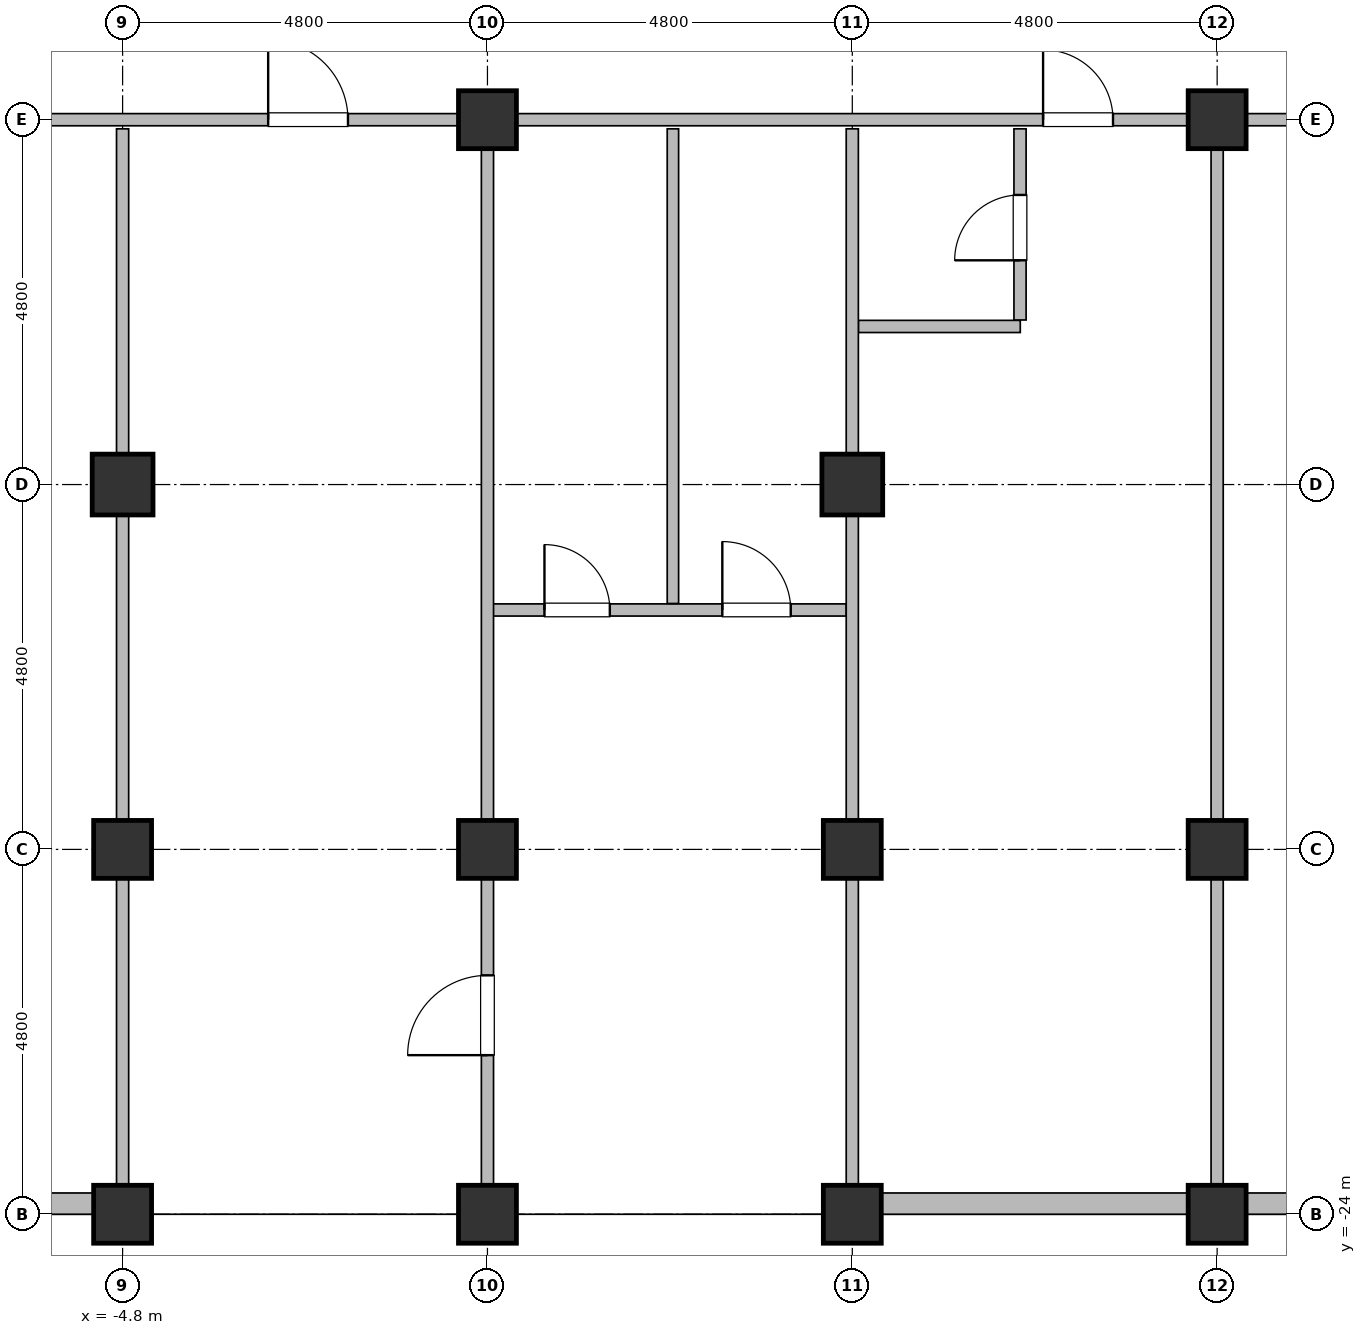
"""IFC4 building model, lengths in metres.
Left out: names, types, materials, properties, quantities, classifications, styles, units other than length and angle.
Written with IfcOpenShell. Run it as: python <this file> out.ifc"""

import sys

from ifc_helpers import new_model, si_unit, direction, frame, frame_2d, origin, origin_2d, place, context, subcontext, project, spatial, rectangle, hollow_rectangle, hollow_circle, extrude, element, fill, save


model = new_model("IFC4")
c1 = context("Model", 3, precision=1e-05, world=origin(), true_north=direction((0.0, 1.0)))
c2 = subcontext(c1, "Body", "Model", "MODEL_VIEW")
j1 = project(units=[si_unit("LENGTHUNIT", "METRE"), si_unit("PLANEANGLEUNIT", "RADIAN")], contexts=[c1])
p1 = place(None, origin())
s1 = spatial("IfcSite", under=j1, at=p1, CompositionType="ELEMENT")
p2 = place(p1, origin())
s2 = spatial("IfcBuilding", under=s1, at=p2, CompositionType="ELEMENT")
p3 = place(p2, frame((0.0, 0.0, 48.5)))
s3 = spatial("IfcBuildingStorey", under=s2, at=p3, CompositionType="ELEMENT", Elevation=48.5)
for number, where, z_axis, x_axis in (
    (1, (-4.8, -24.0, 0.0), (0.0, 0.0, 1.0), (1.0, 0.0, 0.0)),
    (2, (-4.8, -19.2, 0.0), (0.0, 0.0, 1.0), (1.0, 0.0, 0.0)),
):
    element("IfcColumn", number, at=place(p3, frame(where, z_axis=z_axis, x_axis=x_axis)), inside=s3, PredefinedType="COLUMN", context=c2, shape_type="SweptSolid", body=[
        extrude(hollow_circle(Radius=0.381, WallThickness=0.032, at=origin_2d()), origin(), (0.0, 0.0, 1.0), 3.7),
    ])
p4 = place(p3, frame((-4.8, -14.4, 0.0), z_axis=(0.0, 0.0, 1.0), x_axis=(1.0, 0.0, 0.0)))
e3 = element("IfcColumn", 3, at=p4, inside=s3, PredefinedType="COLUMN", context=c2, shape_type="SweptSolid", body=[
    extrude(hollow_rectangle(XDim=0.8, YDim=0.8, WallThickness=0.036, at=origin_2d()), origin(), (0.0, 0.0, 1.0), 3.7),
])
for number, where, z_axis, x_axis in (
    (4, (0.0, -24.0, 0.0), (0.0, 0.0, 1.0), (1.0, 0.0, 0.0)),
    (5, (0.0, -19.2, 0.0), (0.0, 0.0, 1.0), (1.0, 0.0, 0.0)),
    (6, (0.0, -9.6, 0.0), (0.0, 0.0, 1.0), (1.0, 0.0, 0.0)),
    (7, (4.8, -24.0, 0.0), (0.0, 0.0, 1.0), (1.0, 0.0, 0.0)),
    (8, (4.8, -19.2, 0.0), (0.0, 0.0, 1.0), (1.0, 0.0, 0.0)),
):
    element("IfcColumn", number, at=place(p3, frame(where, z_axis=z_axis, x_axis=x_axis)), inside=s3, PredefinedType="COLUMN", context=c2, shape_type="SweptSolid", body=[
        extrude(hollow_circle(Radius=0.381, WallThickness=0.032, at=origin_2d()), origin(), (0.0, 0.0, 1.0), 3.7),
    ])
p5 = place(p3, frame((4.8, -14.4, 0.0), z_axis=(0.0, 0.0, 1.0), x_axis=(1.0, 0.0, 0.0)))
e9 = element("IfcColumn", 9, at=p5, inside=s3, PredefinedType="COLUMN", context=c2, shape_type="SweptSolid", body=[
    extrude(hollow_rectangle(XDim=0.8, YDim=0.8, WallThickness=0.036, at=origin_2d()), origin(), (0.0, 0.0, 1.0), 3.7),
])
for number, where, z_axis, x_axis in (
    (10, (9.6, -24.0, 0.0), (0.0, 0.0, 1.0), (1.0, 0.0, 0.0)),
    (11, (9.6, -19.2, 0.0), (0.0, 0.0, 1.0), (1.0, 0.0, 0.0)),
    (12, (9.6, -9.6, 0.0), (0.0, 0.0, 1.0), (1.0, 0.0, 0.0)),
):
    element("IfcColumn", number, at=place(p3, frame(where, z_axis=z_axis, x_axis=x_axis)), inside=s3, PredefinedType="COLUMN", context=c2, shape_type="SweptSolid", body=[
        extrude(hollow_circle(Radius=0.381, WallThickness=0.032, at=origin_2d()), origin(), (0.0, 0.0, 1.0), 3.7),
    ])
p6 = place(p3, frame((-30.0, -23.86, 0.0), z_axis=(0.0, 0.0, 1.0), x_axis=(1.0, 0.0, 0.0)))
e13 = element("IfcWall", 13, at=p6, inside=s3, PredefinedType="SOLIDWALL", context=c2, shape_type="SweptSolid", body=[
    extrude(rectangle(XDim=25.25, YDim=0.28, at=frame_2d((12.625, 0.0))), origin(), (0.0, 0.0, 1.0), 2.12),
])
p7 = place(p6, frame((11.798, 0.0, 0.75)))
e14 = element("IfcOpeningElement", 14, at=p7, cuts=e13, PredefinedType="OPENING", context=c2, shape_type="SweptSolid", body=[
    extrude(rectangle(XDim=1.8, YDim=1.15, at=frame_2d((0.9, 0.575))), frame((0.0, 0.155, 0.0), z_axis=(0.0, -1.0, 0.0), x_axis=(1.0, 0.0, 0.0)), (0.0, 0.0, 1.0), 0.31),
])
p8 = place(p3, frame((4.75, -23.86, 0.0), z_axis=(0.0, 0.0, 1.0), x_axis=(1.0, 0.0, 0.0)))
e15 = element("IfcWall", 15, at=p8, inside=s3, PredefinedType="SOLIDWALL", context=c2, shape_type="SweptSolid", body=[
    extrude(rectangle(XDim=20.45, YDim=0.28, at=frame_2d((10.225, 0.0))), origin(), (0.0, 0.0, 1.0), 2.12),
])
p9 = place(p8, frame((1.55, 0.0, 0.75)))
e16 = element("IfcOpeningElement", 16, at=p9, cuts=e15, PredefinedType="OPENING", context=c2, shape_type="SweptSolid", body=[
    extrude(rectangle(XDim=1.8, YDim=1.15, at=frame_2d((0.9, 0.575))), frame((0.0, 0.155, 0.0), z_axis=(0.0, -1.0, 0.0), x_axis=(1.0, 0.0, 0.0)), (0.0, 0.0, 1.0), 0.31),
])
p10 = place(p8, frame((6.35, 0.0, 0.75)))
e17 = element("IfcOpeningElement", 17, at=p10, cuts=e15, PredefinedType="OPENING", context=c2, shape_type="SweptSolid", body=[
    extrude(rectangle(XDim=1.8, YDim=1.15, at=frame_2d((0.9, 0.575))), frame((0.0, 0.155, 0.0), z_axis=(0.0, -1.0, 0.0), x_axis=(1.0, 0.0, 0.0)), (0.0, 0.0, 1.0), 0.31),
])
p11 = place(p8, frame((11.15, 0.0, 0.75)))
e18 = element("IfcOpeningElement", 18, at=p11, cuts=e15, PredefinedType="OPENING", context=c2, shape_type="SweptSolid", body=[
    extrude(rectangle(XDim=1.8, YDim=1.15, at=frame_2d((0.9, 0.575))), frame((0.0, 0.155, 0.0), z_axis=(0.0, -1.0, 0.0), x_axis=(1.0, 0.0, 0.0)), (0.0, 0.0, 1.0), 0.31),
])
p12 = place(p3, frame((0.0, -16.05, 0.0), z_axis=(0.0, 0.0, 1.0), x_axis=(1.0, 0.0, 0.0)))
e19 = element("IfcWall", 19, at=p12, inside=s3, PredefinedType="PARTITIONING", context=c2, shape_type="SweptSolid", body=[
    extrude(rectangle(XDim=4.72, YDim=0.16, at=frame_2d((2.36, 0.0))), origin(), (0.0, 0.0, 1.0), 2.82),
])
p13 = place(p12, frame((0.75, 0.0, 0.0)))
e20 = element("IfcOpeningElement", 20, at=p13, cuts=e19, PredefinedType="OPENING", context=c2, shape_type="SweptSolid", body=[
    extrude(rectangle(XDim=0.86, YDim=2.1, at=frame_2d((0.43, 1.05))), frame((0.0, 0.095, 0.0), z_axis=(0.0, -1.0, 0.0), x_axis=(1.0, 0.0, 0.0)), (0.0, 0.0, 1.0), 0.19),
])
p14 = place(p12, frame((3.09, 0.0, 0.0)))
e21 = element("IfcOpeningElement", 21, at=p14, cuts=e19, PredefinedType="OPENING", context=c2, shape_type="SweptSolid", body=[
    extrude(rectangle(XDim=0.9, YDim=2.1, at=frame_2d((0.45, 1.05))), frame((0.0, 0.095, 0.0), z_axis=(0.0, -1.0, 0.0), x_axis=(1.0, 0.0, 0.0)), (0.0, 0.0, 1.0), 0.19),
])
p15 = place(p3, frame((4.88, -12.32, 0.0), z_axis=(0.0, 0.0, 1.0), x_axis=(1.0, 0.0, 0.0)))
e22 = element("IfcWall", 22, at=p15, inside=s3, PredefinedType="PARTITIONING", context=c2, shape_type="SweptSolid", body=[
    extrude(rectangle(XDim=2.13, YDim=0.16, at=frame_2d((1.065, 0.0))), origin(), (0.0, 0.0, 1.0), 2.82),
])
p16 = place(p3, frame((-33.31, -9.6, 0.0), z_axis=(0.0, 0.0, 1.0), x_axis=(1.0, 0.0, 0.0)))
e23 = element("IfcWall", 23, at=p16, inside=s3, PredefinedType="PARTITIONING", context=c2, shape_type="SweptSolid", body=[
    extrude(rectangle(XDim=61.82, YDim=0.16, at=frame_2d((30.91, 0.0))), origin(), (0.0, 0.0, 1.0), 2.62),
])
p17 = place(p16, frame((6.42, 0.0, 0.0)))
e24 = element("IfcOpeningElement", 24, at=p17, cuts=e23, PredefinedType="OPENING", context=c2, shape_type="SweptSolid", body=[
    extrude(rectangle(XDim=0.9, YDim=2.1, at=frame_2d((0.45, 1.05))), frame((0.0, 0.095, 0.0), z_axis=(0.0, -1.0, 0.0), x_axis=(1.0, 0.0, 0.0)), (0.0, 0.0, 1.0), 0.19),
])
p18 = place(p16, frame((54.5, 0.0, 0.0)))
e25 = element("IfcOpeningElement", 25, at=p18, cuts=e23, PredefinedType="OPENING", context=c2, shape_type="SweptSolid", body=[
    extrude(rectangle(XDim=0.9, YDim=2.1, at=frame_2d((0.45, 1.05))), frame((0.0, 0.095, 0.0), z_axis=(0.0, -1.0, 0.0), x_axis=(1.0, 0.0, 0.0)), (0.0, 0.0, 1.0), 0.19),
])
p19 = place(p16, frame((11.26, 0.0, 0.0)))
e26 = element("IfcOpeningElement", 26, at=p19, cuts=e23, PredefinedType="OPENING", context=c2, shape_type="SweptSolid", body=[
    extrude(rectangle(XDim=0.9, YDim=2.1, at=frame_2d((0.45, 1.05))), frame((0.0, 0.095, 0.0), z_axis=(0.0, -1.0, 0.0), x_axis=(1.0, 0.0, 0.0)), (0.0, 0.0, 1.0), 0.19),
])
p20 = place(p16, frame((30.425, 0.0, 0.0)))
e27 = element("IfcOpeningElement", 27, at=p20, cuts=e23, PredefinedType="OPENING", context=c2, shape_type="SweptSolid", body=[
    extrude(rectangle(XDim=1.05, YDim=2.2, at=frame_2d((0.525, 1.1))), frame((0.0, 0.095, 0.0), z_axis=(0.0, -1.0, 0.0), x_axis=(1.0, 0.0, 0.0)), (0.0, 0.0, 1.0), 0.19),
])
p21 = place(p16, frame((40.62, 0.0, 0.0)))
e28 = element("IfcOpeningElement", 28, at=p21, cuts=e23, PredefinedType="OPENING", context=c2, shape_type="SweptSolid", body=[
    extrude(rectangle(XDim=0.92, YDim=2.15, at=frame_2d((0.46, 1.075))), frame((0.0, 0.095, 0.0), z_axis=(0.0, -1.0, 0.0), x_axis=(1.0, 0.0, 0.0)), (0.0, 0.0, 1.0), 0.19),
])
p22 = place(p16, frame((44.28, 0.0, 0.0)))
e29 = element("IfcOpeningElement", 29, at=p22, cuts=e23, PredefinedType="OPENING", context=c2, shape_type="SweptSolid", body=[
    extrude(rectangle(XDim=0.92, YDim=2.15, at=frame_2d((0.46, 1.075))), frame((0.0, 0.095, 0.0), z_axis=(0.0, -1.0, 0.0), x_axis=(1.0, 0.0, 0.0)), (0.0, 0.0, 1.0), 0.19),
])
p23 = place(p16, frame((50.22, 0.0, 0.0)))
e30 = element("IfcOpeningElement", 30, at=p23, cuts=e23, PredefinedType="OPENING", context=c2, shape_type="SweptSolid", body=[
    extrude(rectangle(XDim=0.92, YDim=2.15, at=frame_2d((0.46, 1.075))), frame((0.0, 0.095, 0.0), z_axis=(0.0, -1.0, 0.0), x_axis=(1.0, 0.0, 0.0)), (0.0, 0.0, 1.0), 0.19),
])
p24 = place(p3, frame((-4.8, -23.71, 0.0), z_axis=(0.0, 0.0, 1.0), x_axis=(0.0, 1.0, 0.0)))
e31 = element("IfcWall", 31, at=p24, inside=s3, PredefinedType="PARTITIONING", context=c2, shape_type="SweptSolid", body=[
    extrude(rectangle(XDim=13.99, YDim=0.16, at=frame_2d((6.995, 0.0))), origin(), (0.0, 0.0, 1.0), 2.62),
])
p25 = place(p3, frame((0.0, -23.795, 0.0), z_axis=(0.0, 0.0, 1.0), x_axis=(0.0, 1.0, 0.0)))
e32 = element("IfcWall", 32, at=p25, inside=s3, PredefinedType="PARTITIONING", context=c2, shape_type="SweptSolid", body=[
    extrude(rectangle(XDim=14.075, YDim=0.16, at=frame_2d((7.038, 0.0))), origin(), (0.0, 0.0, 1.0), 2.62),
])
p26 = place(p25, frame((1.888, 0.0, 0.0)))
e33 = element("IfcOpeningElement", 33, at=p26, cuts=e32, PredefinedType="OPENING", context=c2, shape_type="SweptSolid", body=[
    extrude(rectangle(XDim=1.05, YDim=2.2, at=frame_2d((0.525, 1.1))), frame((0.0, 0.095, 0.0), z_axis=(0.0, -1.0, 0.0), x_axis=(1.0, 0.0, 0.0)), (0.0, 0.0, 1.0), 0.19),
])
p27 = place(p3, frame((2.44, -15.965, 0.0), z_axis=(0.0, 0.0, 1.0), x_axis=(0.0, 1.0, 0.0)))
e34 = element("IfcWall", 34, at=p27, inside=s3, PredefinedType="PARTITIONING", context=c2, shape_type="SweptSolid", body=[
    extrude(rectangle(XDim=6.245, YDim=0.15, at=frame_2d((3.123, 0.0))), origin(), (0.0, 0.0, 1.0), 2.62),
])
p28 = place(p3, frame((4.8, -23.71, 0.0), z_axis=(0.0, 0.0, 1.0), x_axis=(0.0, 1.0, 0.0)))
e35 = element("IfcWall", 35, at=p28, inside=s3, PredefinedType="PARTITIONING", context=c2, shape_type="SweptSolid", body=[
    extrude(rectangle(XDim=13.99, YDim=0.16, at=frame_2d((6.995, 0.0))), origin(), (0.0, 0.0, 1.0), 2.62),
])
p29 = place(p3, frame((7.007, -12.235, 0.0), z_axis=(0.0, 0.0, 1.0), x_axis=(0.0, 1.0, 0.0)))
e36 = element("IfcWall", 36, at=p29, inside=s3, PredefinedType="PARTITIONING", context=c2, shape_type="SweptSolid", body=[
    extrude(rectangle(XDim=2.515, YDim=0.16, at=frame_2d((1.258, 0.0))), origin(), (0.0, 0.0, 1.0), 2.62),
])
p30 = place(p29, frame((0.785, 0.0, 0.0)))
e37 = element("IfcOpeningElement", 37, at=p30, cuts=e36, PredefinedType="OPENING", context=c2, shape_type="SweptSolid", body=[
    extrude(rectangle(XDim=0.86, YDim=2.1, at=frame_2d((0.43, 1.05))), frame((0.0, 0.095, 0.0), z_axis=(0.0, -1.0, 0.0), x_axis=(1.0, 0.0, 0.0)), (0.0, 0.0, 1.0), 0.19),
])
p31 = place(p3, frame((9.6, -23.71, 0.0), z_axis=(0.0, 0.0, 1.0), x_axis=(0.0, 1.0, 0.0)))
e38 = element("IfcWall", 38, at=p31, inside=s3, PredefinedType="PARTITIONING", context=c2, shape_type="SweptSolid", body=[
    extrude(rectangle(XDim=13.99, YDim=0.16, at=frame_2d((6.995, 0.0))), origin(), (0.0, 0.0, 1.0), 2.62),
])
p32 = place(p9, origin())
e39 = element("IfcWindow", 39, at=p32, inside=s3, PartitioningType="SINGLE_PANEL", PredefinedType="WINDOW", context=c2, shape_type="SweptSolid", body=[
    extrude(rectangle(XDim=1.8, YDim=1.15, at=frame_2d((0.9, 0.575))), frame((0.0, 0.03, 0.0), z_axis=(0.0, -1.0, 0.0), x_axis=(1.0, 0.0, 0.0)), (0.0, 0.0, 1.0), 0.06),
])
fill(e16, e39)
p33 = place(p20, origin())
e40 = element("IfcDoor", 40, at=p33, inside=s3, OperationType="SINGLE_SWING_RIGHT", PredefinedType="DOOR", context=c2, shape_type="SweptSolid", body=[
    extrude(rectangle(XDim=1.05, YDim=2.2, at=frame_2d((0.525, 1.1))), frame((0.0, 0.025, 0.0), z_axis=(0.0, -1.0, 0.0), x_axis=(1.0, 0.0, 0.0)), (0.0, 0.0, 1.0), 0.05),
])
fill(e27, e40)
p34 = place(p26, origin())
e41 = element("IfcDoor", 41, at=p34, inside=s3, OperationType="SINGLE_SWING_LEFT", PredefinedType="DOOR", context=c2, shape_type="SweptSolid", body=[
    extrude(rectangle(XDim=1.05, YDim=2.2, at=frame_2d((0.525, 1.1))), frame((0.0, 0.025, 0.0), z_axis=(0.0, -1.0, 0.0), x_axis=(1.0, 0.0, 0.0)), (0.0, 0.0, 1.0), 0.05),
])
fill(e33, e41)
p35 = place(p13, origin())
e42 = element("IfcDoor", 42, at=p35, inside=s3, OperationType="SINGLE_SWING_LEFT", PredefinedType="DOOR", context=c2, shape_type="SweptSolid", body=[
    extrude(rectangle(XDim=0.86, YDim=2.1, at=frame_2d((0.43, 1.05))), frame((0.0, 0.025, 0.0), z_axis=(0.0, -1.0, 0.0), x_axis=(1.0, 0.0, 0.0)), (0.0, 0.0, 1.0), 0.05),
])
fill(e20, e42)
p36 = place(p14, origin())
e43 = element("IfcDoor", 43, at=p36, inside=s3, OperationType="SINGLE_SWING_LEFT", PredefinedType="DOOR", context=c2, shape_type="SweptSolid", body=[
    extrude(rectangle(XDim=0.9, YDim=2.1, at=frame_2d((0.45, 1.05))), frame((0.0, 0.025, 0.0), z_axis=(0.0, -1.0, 0.0), x_axis=(1.0, 0.0, 0.0)), (0.0, 0.0, 1.0), 0.05),
])
fill(e21, e43)
p37 = place(p21, origin())
e44 = element("IfcDoor", 44, at=p37, inside=s3, OperationType="SINGLE_SWING_LEFT", PredefinedType="DOOR", context=c2, shape_type="SweptSolid", body=[
    extrude(rectangle(XDim=0.92, YDim=2.15, at=frame_2d((0.46, 1.075))), frame((0.0, 0.025, 0.0), z_axis=(0.0, -1.0, 0.0), x_axis=(1.0, 0.0, 0.0)), (0.0, 0.0, 1.0), 0.05),
])
fill(e28, e44)
p38 = place(p30, origin())
e45 = element("IfcDoor", 45, at=p38, inside=s3, OperationType="SINGLE_SWING_RIGHT", PredefinedType="DOOR", context=c2, shape_type="SweptSolid", body=[
    extrude(rectangle(XDim=0.86, YDim=2.1, at=frame_2d((0.43, 1.05))), frame((0.0, 0.025, 0.0), z_axis=(0.0, -1.0, 0.0), x_axis=(1.0, 0.0, 0.0)), (0.0, 0.0, 1.0), 0.05),
])
fill(e37, e45)
save(model, sys.argv[1])
